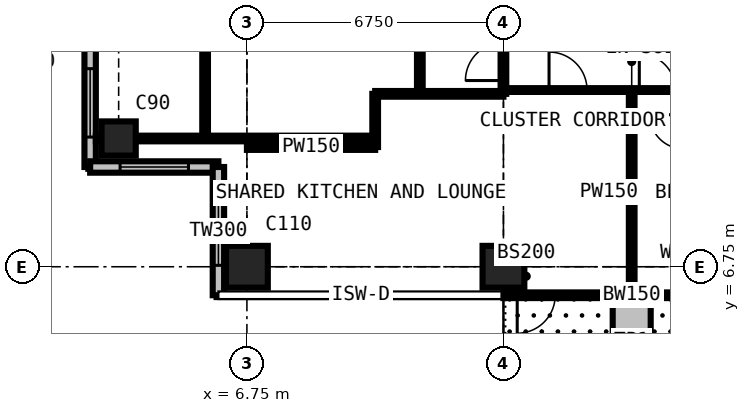
"""IFC4 building model, lengths in metres.
Left out: names, types, materials, properties, quantities, classifications, styles, units other than length and angle.
Written with IfcOpenShell. Run it as: python <this file> out.ifc"""

import sys

from ifc_helpers import new_model, si_unit, direction, frame, frame_2d, origin, origin_2d, place, context, subcontext, project, spatial, rectangle, extrude, element, fill, save


model = new_model("IFC4")
c1 = context("Model", 3, precision=1e-05, world=origin(), true_north=direction((0.0, 1.0)))
c2 = subcontext(c1, "Body", "Model", "MODEL_VIEW")
j1 = project(units=[si_unit("LENGTHUNIT", "METRE"), si_unit("PLANEANGLEUNIT", "RADIAN")], contexts=[c1])
p1 = place(None, origin())
s1 = spatial("IfcSite", under=j1, at=p1, CompositionType="ELEMENT")
p2 = place(p1, origin())
s2 = spatial("IfcBuilding", under=s1, at=p2, CompositionType="ELEMENT")
p3 = place(p2, frame((0.0, 0.0, 211.5)))
s3 = spatial("IfcBuildingStorey", under=s2, at=p3, CompositionType="ELEMENT", Elevation=211.5)
p4 = place(p3, frame((3.375, 10.125, 0.0), z_axis=(0.0, 0.0, 1.0), x_axis=(1.0, 0.0, 0.0)))
e1 = element("IfcColumn", 1, at=p4, inside=s3, PredefinedType="COLUMN", context=c2, shape_type="SweptSolid", body=[
    extrude(rectangle(XDim=0.9, YDim=0.9, at=origin_2d()), origin(), (0.0, 0.0, 1.0), 3.6),
])
for number, where, z_axis, x_axis in (
    (2, (6.75, 6.75, 0.0), (0.0, 0.0, 1.0), (1.0, 0.0, 0.0)),
    (3, (13.5, 6.75, 0.0), (0.0, 0.0, 1.0), (1.0, 0.0, 0.0)),
):
    element("IfcColumn", number, at=place(p3, frame(where, z_axis=z_axis, x_axis=x_axis)), inside=s3, PredefinedType="COLUMN", context=c2, shape_type="SweptSolid", body=[
        extrude(rectangle(XDim=1.1, YDim=1.1, at=origin_2d()), origin(), (0.0, 0.0, 1.0), 3.6),
    ])
p5 = place(p3, frame((2.625, 12.75, 0.0), z_axis=(0.0, 0.0, 1.0), x_axis=(0.0, -1.0, 0.0)))
e4 = element("IfcWall", 4, at=p5, inside=s3, PredefinedType="SOLIDWALL", context=c2, shape_type="SweptSolid", body=[
    extrude(rectangle(XDim=3.375, YDim=0.3, at=frame_2d((1.688, 0.0))), origin(), (0.0, 0.0, 1.0), 3.375),
])
p6 = place(p5, frame((0.788, 0.0, 0.6)))
e5 = element("IfcOpeningElement", 5, at=p6, cuts=e4, PredefinedType="OPENING", context=c2, shape_type="SweptSolid", body=[
    extrude(rectangle(XDim=1.8, YDim=2.1, at=frame_2d((0.9, 1.05))), frame((0.0, 0.16, 0.0), z_axis=(0.0, -1.0, 0.0), x_axis=(1.0, 0.0, 0.0)), (0.0, 0.0, 1.0), 0.32),
])
p7 = place(p3, frame((2.625, 9.375, 0.0), z_axis=(0.0, 0.0, 1.0), x_axis=(1.0, 0.0, 0.0)))
e6 = element("IfcWall", 6, at=p7, inside=s3, PredefinedType="SOLIDWALL", context=c2, shape_type="SweptSolid", body=[
    extrude(rectangle(XDim=3.375, YDim=0.3, at=frame_2d((1.688, 0.0))), origin(), (0.0, 0.0, 1.0), 3.375),
])
p8 = place(p7, frame((0.788, 0.0, 0.6)))
e7 = element("IfcOpeningElement", 7, at=p8, cuts=e6, PredefinedType="OPENING", context=c2, shape_type="SweptSolid", body=[
    extrude(rectangle(XDim=1.8, YDim=2.1, at=frame_2d((0.9, 1.05))), frame((0.0, 0.16, 0.0), z_axis=(0.0, -1.0, 0.0), x_axis=(1.0, 0.0, 0.0)), (0.0, 0.0, 1.0), 0.32),
])
p9 = place(p3, frame((6.0, 9.375, 0.0), z_axis=(0.0, 0.0, 1.0), x_axis=(0.0, -1.0, 0.0)))
e8 = element("IfcWall", 8, at=p9, inside=s3, PredefinedType="SOLIDWALL", context=c2, shape_type="SweptSolid", body=[
    extrude(rectangle(XDim=3.375, YDim=0.3, at=frame_2d((1.688, 0.0))), origin(), (0.0, 0.0, 1.0), 3.375),
])
p10 = place(p9, frame((0.788, 0.0, 0.6)))
e9 = element("IfcOpeningElement", 9, at=p10, cuts=e8, PredefinedType="OPENING", context=c2, shape_type="SweptSolid", body=[
    extrude(rectangle(XDim=1.8, YDim=2.1, at=frame_2d((0.9, 1.05))), frame((0.0, 0.16, 0.0), z_axis=(0.0, -1.0, 0.0), x_axis=(1.0, 0.0, 0.0)), (0.0, 0.0, 1.0), 0.32),
])
p11 = place(p3, frame((20.25, 6.0, 0.0), z_axis=(0.0, 0.0, 1.0), x_axis=(-1.0, 0.0, 0.0)))
e10 = element("IfcWall", 10, at=p11, inside=s3, PredefinedType="SOLIDWALL", context=c2, shape_type="SweptSolid", body=[
    extrude(rectangle(XDim=6.75, YDim=0.15, at=frame_2d((3.375, 0.0))), origin(), (0.0, 0.0, 1.0), 3.375),
])
p12 = place(p11, frame((0.363, 0.0, 0.0)))
e11 = element("IfcOpeningElement", 11, at=p12, cuts=e10, PredefinedType="OPENING", context=c2, shape_type="SweptSolid", body=[
    extrude(rectangle(XDim=1.0, YDim=2.2, at=frame_2d((0.5, 1.1))), frame((0.0, 0.085, 0.0), z_axis=(0.0, -1.0, 0.0), x_axis=(1.0, 0.0, 0.0)), (0.0, 0.0, 1.0), 0.17),
])
p13 = place(p11, frame((1.725, 0.0, 0.9)))
e12 = element("IfcOpeningElement", 12, at=p13, cuts=e10, PredefinedType="OPENING", context=c2, shape_type="SweptSolid", body=[
    extrude(rectangle(XDim=1.2, YDim=1.8, at=frame_2d((0.6, 0.9))), frame((0.0, 0.085, 0.0), z_axis=(0.0, -1.0, 0.0), x_axis=(1.0, 0.0, 0.0)), (0.0, 0.0, 1.0), 0.17),
])
p14 = place(p11, frame((5.387, 0.0, 0.0)))
e13 = element("IfcOpeningElement", 13, at=p14, cuts=e10, PredefinedType="OPENING", context=c2, shape_type="SweptSolid", body=[
    extrude(rectangle(XDim=1.0, YDim=2.2, at=frame_2d((0.5, 1.1))), frame((0.0, 0.085, 0.0), z_axis=(0.0, -1.0, 0.0), x_axis=(1.0, 0.0, 0.0)), (0.0, 0.0, 1.0), 0.17),
])
p15 = place(p11, frame((3.825, 0.0, 0.9)))
e14 = element("IfcOpeningElement", 14, at=p15, cuts=e10, PredefinedType="OPENING", context=c2, shape_type="SweptSolid", body=[
    extrude(rectangle(XDim=1.2, YDim=1.8, at=frame_2d((0.6, 0.9))), frame((0.0, 0.085, 0.0), z_axis=(0.0, -1.0, 0.0), x_axis=(1.0, 0.0, 0.0)), (0.0, 0.0, 1.0), 0.17),
])
p16 = place(p3, frame((16.875, 5.9, 0.0), z_axis=(0.0, 0.0, 1.0), x_axis=(0.0, -1.0, 0.0)))
e15 = element("IfcWall", 15, at=p16, inside=s3, PredefinedType="USERDEFINED", context=c2, shape_type="SweptSolid", body=[
    extrude(rectangle(XDim=2.2, YDim=1.0, at=frame_2d((1.1, 0.0))), origin(), (0.0, 0.0, 1.0), 0.9),
])
p17 = place(p3, frame((2.775, 10.125, 0.0), z_axis=(0.0, 0.0, 1.0), x_axis=(1.0, 0.0, 0.0)))
e16 = element("IfcWall", 16, at=p17, inside=s3, PredefinedType="PARTITIONING", context=c2, shape_type="SweptSolid", body=[
    extrude(rectangle(XDim=7.35, YDim=0.15, at=frame_2d((3.675, 0.0))), origin(), (0.0, 0.0, 1.0), 2.877),
])
p18 = place(p3, frame((5.65, 10.125, 0.0), z_axis=(0.0, 0.0, 1.0), x_axis=(0.0, 1.0, 0.0)))
e17 = element("IfcWall", 17, at=p18, inside=s3, PredefinedType="PARTITIONING", context=c2, shape_type="SweptSolid", body=[
    extrude(rectangle(XDim=10.762, YDim=0.15, at=frame_2d((5.381, 0.0))), origin(), (0.0, 0.0, 1.0), 3.375),
])
p19 = place(p18, frame((4.9, 0.0, 0.0)))
e18 = element("IfcOpeningElement", 18, at=p19, cuts=e17, PredefinedType="OPENING", context=c2, shape_type="SweptSolid", body=[
    extrude(rectangle(XDim=0.95, YDim=2.2, at=frame_2d((0.475, 1.1))), frame((0.0, 0.085, 0.0), z_axis=(0.0, -1.0, 0.0), x_axis=(1.0, 0.0, 0.0)), (0.0, 0.0, 1.0), 0.17),
])
p20 = place(p3, frame((6.75, 9.9, 0.0), z_axis=(0.0, 0.0, 1.0), x_axis=(1.0, 0.0, 0.0)))
e19 = element("IfcWall", 19, at=p20, inside=s3, PredefinedType="PARTITIONING", context=c2, shape_type="SweptSolid", body=[
    extrude(rectangle(XDim=3.375, YDim=0.15, at=frame_2d((1.688, 0.0))), origin(), (0.0, 0.0, 1.0), 3.375),
])
p21 = place(p3, frame((10.125, 9.9, 0.0), z_axis=(0.0, 0.0, 1.0), x_axis=(0.0, 1.0, 0.0)))
e20 = element("IfcWall", 20, at=p21, inside=s3, PredefinedType="PARTITIONING", context=c2, shape_type="SweptSolid", body=[
    extrude(rectangle(XDim=1.4, YDim=0.15, at=frame_2d((0.7, 0.0))), origin(), (0.0, 0.0, 1.0), 3.375),
])
p22 = place(p3, frame((10.125, 11.3, 0.0), z_axis=(0.0, 0.0, 1.0), x_axis=(1.0, 0.0, 0.0)))
e21 = element("IfcWall", 21, at=p22, inside=s3, PredefinedType="PARTITIONING", context=c2, shape_type="SweptSolid", body=[
    extrude(rectangle(XDim=3.375, YDim=0.15, at=frame_2d((1.688, 0.0))), origin(), (0.0, 0.0, 1.0), 3.375),
])
p23 = place(p3, frame((11.3, 11.3, 0.0), z_axis=(0.0, 0.0, 1.0), x_axis=(0.0, 1.0, 0.0)))
e22 = element("IfcWall", 22, at=p23, inside=s3, PredefinedType="PARTITIONING", context=c2, shape_type="SweptSolid", body=[
    extrude(rectangle(XDim=19.3, YDim=0.15, at=frame_2d((9.65, 0.0))), origin(), (0.0, 0.0, 1.0), 3.375),
])
p24 = place(p23, frame((18.1, 0.0, 0.0)))
e23 = element("IfcOpeningElement", 23, at=p24, cuts=e22, PredefinedType="OPENING", context=c2, shape_type="SweptSolid", body=[
    extrude(rectangle(XDim=1.0, YDim=2.2, at=frame_2d((0.5, 1.1))), frame((0.0, 0.085, 0.0), z_axis=(0.0, -1.0, 0.0), x_axis=(1.0, 0.0, 0.0)), (0.0, 0.0, 1.0), 0.17),
])
p25 = place(p23, frame((10.137, 0.0, 0.0)))
e24 = element("IfcOpeningElement", 24, at=p25, cuts=e22, PredefinedType="OPENING", context=c2, shape_type="SweptSolid", body=[
    extrude(rectangle(XDim=1.0, YDim=2.2, at=frame_2d((0.5, 1.1))), frame((0.0, 0.085, 0.0), z_axis=(0.0, -1.0, 0.0), x_axis=(1.0, 0.0, 0.0)), (0.0, 0.0, 1.0), 0.17),
])
p26 = place(p3, frame((13.5, 11.3, 0.0), z_axis=(0.0, 0.0, 1.0), x_axis=(0.0, 1.0, 0.0)))
e25 = element("IfcWall", 25, at=p26, inside=s3, PredefinedType="PARTITIONING", context=c2, shape_type="SweptSolid", body=[
    extrude(rectangle(XDim=1.6, YDim=0.15, at=frame_2d((0.8, 0.0))), origin(), (0.0, 0.0, 1.0), 2.877),
])
p27 = place(p26, frame((0.35, 0.0, 0.0)))
e26 = element("IfcOpeningElement", 26, at=p27, cuts=e25, PredefinedType="OPENING", context=c2, shape_type="SweptSolid", body=[
    extrude(rectangle(XDim=1.0, YDim=2.2, at=frame_2d((0.5, 1.1))), frame((0.0, 0.085, 0.0), z_axis=(0.0, -1.0, 0.0), x_axis=(1.0, 0.0, 0.0)), (0.0, 0.0, 1.0), 0.17),
])
p28 = place(p3, frame((13.5, 11.4, 0.0), z_axis=(0.0, 0.0, 1.0), x_axis=(1.0, 0.0, 0.0)))
e27 = element("IfcWall", 27, at=p28, inside=s3, PredefinedType="PARTITIONING", context=c2, shape_type="SweptSolid", body=[
    extrude(rectangle(XDim=10.125, YDim=0.1, at=frame_2d((5.062, 0.0))), origin(), (0.0, 0.0, 1.0), 3.375),
])
p29 = place(p28, frame((1.2, 0.0, 0.0)))
e28 = element("IfcOpeningElement", 28, at=p29, cuts=e27, PredefinedType="OPENING", context=c2, shape_type="SweptSolid", body=[
    extrude(rectangle(XDim=1.0, YDim=2.2, at=frame_2d((0.5, 1.1))), frame((0.0, 0.06, 0.0), z_axis=(0.0, -1.0, 0.0), x_axis=(1.0, 0.0, 0.0)), (0.0, 0.0, 1.0), 0.12),
])
p30 = place(p28, frame((3.575, 0.0, 0.0)))
e29 = element("IfcOpeningElement", 29, at=p30, cuts=e27, PredefinedType="OPENING", context=c2, shape_type="SweptSolid", body=[
    extrude(rectangle(XDim=0.95, YDim=2.2, at=frame_2d((0.475, 1.1))), frame((0.0, 0.06, 0.0), z_axis=(0.0, -1.0, 0.0), x_axis=(1.0, 0.0, 0.0)), (0.0, 0.0, 1.0), 0.12),
])
p31 = place(p28, frame((6.95, 0.0, 0.0)))
e30 = element("IfcOpeningElement", 30, at=p31, cuts=e27, PredefinedType="OPENING", context=c2, shape_type="SweptSolid", body=[
    extrude(rectangle(XDim=0.95, YDim=2.2, at=frame_2d((0.475, 1.1))), frame((0.0, 0.06, 0.0), z_axis=(0.0, -1.0, 0.0), x_axis=(1.0, 0.0, 0.0)), (0.0, 0.0, 1.0), 0.12),
])
p32 = place(p3, frame((16.875, 6.016, 0.0), z_axis=(0.0, 0.0, 1.0), x_axis=(0.0, 1.0, 0.0)))
e31 = element("IfcWall", 31, at=p32, inside=s3, PredefinedType="PARTITIONING", context=c2, shape_type="SweptSolid", body=[
    extrude(rectangle(XDim=5.384, YDim=0.15, at=frame_2d((2.692, 0.0))), origin(), (0.0, 0.0, 1.0), 3.375),
])
p33 = place(p6, origin())
e32 = element("IfcWindow", 32, at=p33, inside=s3, PartitioningType="SINGLE_PANEL", PredefinedType="WINDOW", context=c2, shape_type="SweptSolid", body=[
    extrude(rectangle(XDim=1.8, YDim=2.1, at=frame_2d((0.9, 1.05))), frame((0.0, 0.03, 0.0), z_axis=(0.0, -1.0, 0.0), x_axis=(1.0, 0.0, 0.0)), (0.0, 0.0, 1.0), 0.06),
])
fill(e5, e32)
p34 = place(p8, origin())
e33 = element("IfcWindow", 33, at=p34, inside=s3, PartitioningType="SINGLE_PANEL", PredefinedType="WINDOW", context=c2, shape_type="SweptSolid", body=[
    extrude(rectangle(XDim=1.8, YDim=2.1, at=frame_2d((0.9, 1.05))), frame((0.0, 0.03, 0.0), z_axis=(0.0, -1.0, 0.0), x_axis=(1.0, 0.0, 0.0)), (0.0, 0.0, 1.0), 0.06),
])
fill(e7, e33)
p35 = place(p10, origin())
e34 = element("IfcWindow", 34, at=p35, inside=s3, PartitioningType="SINGLE_PANEL", PredefinedType="WINDOW", context=c2, shape_type="SweptSolid", body=[
    extrude(rectangle(XDim=1.8, YDim=2.1, at=frame_2d((0.9, 1.05))), frame((0.0, 0.03, 0.0), z_axis=(0.0, -1.0, 0.0), x_axis=(1.0, 0.0, 0.0)), (0.0, 0.0, 1.0), 0.06),
])
fill(e9, e34)
p36 = place(p13, origin())
e35 = element("IfcWindow", 35, at=p36, inside=s3, PartitioningType="SINGLE_PANEL", PredefinedType="WINDOW", context=c2, shape_type="SweptSolid", body=[
    extrude(rectangle(XDim=1.2, YDim=1.8, at=frame_2d((0.6, 0.9))), frame((0.0, 0.03, 0.0), z_axis=(0.0, -1.0, 0.0), x_axis=(1.0, 0.0, 0.0)), (0.0, 0.0, 1.0), 0.06),
])
fill(e12, e35)
p37 = place(p14, origin())
e36 = element("IfcDoor", 36, at=p37, inside=s3, OperationType="SINGLE_SWING_RIGHT", PredefinedType="DOOR", context=c2, shape_type="SweptSolid", body=[
    extrude(rectangle(XDim=1.0, YDim=2.2, at=frame_2d((0.5, 1.1))), frame((0.0, 0.025, 0.0), z_axis=(0.0, -1.0, 0.0), x_axis=(1.0, 0.0, 0.0)), (0.0, 0.0, 1.0), 0.05),
])
fill(e13, e36)
p38 = place(p15, origin())
e37 = element("IfcWindow", 37, at=p38, inside=s3, PartitioningType="SINGLE_PANEL", PredefinedType="WINDOW", context=c2, shape_type="SweptSolid", body=[
    extrude(rectangle(XDim=1.2, YDim=1.8, at=frame_2d((0.6, 0.9))), frame((0.0, 0.03, 0.0), z_axis=(0.0, -1.0, 0.0), x_axis=(1.0, 0.0, 0.0)), (0.0, 0.0, 1.0), 0.06),
])
fill(e14, e37)
p39 = place(p29, origin())
e38 = element("IfcDoor", 38, at=p39, inside=s3, OperationType="SINGLE_SWING_LEFT", PredefinedType="DOOR", context=c2, shape_type="SweptSolid", body=[
    extrude(rectangle(XDim=1.0, YDim=2.2, at=frame_2d((0.5, 1.1))), frame((0.0, 0.025, 0.0), z_axis=(0.0, -1.0, 0.0), x_axis=(1.0, 0.0, 0.0)), (0.0, 0.0, 1.0), 0.05),
])
fill(e28, e38)
p40 = place(p30, origin())
e39 = element("IfcDoor", 39, at=p40, inside=s3, OperationType="SINGLE_SWING_LEFT", PredefinedType="DOOR", context=c2, shape_type="SweptSolid", body=[
    extrude(rectangle(XDim=0.95, YDim=2.2, at=frame_2d((0.475, 1.1))), frame((0.0, 0.025, 0.0), z_axis=(0.0, -1.0, 0.0), x_axis=(1.0, 0.0, 0.0)), (0.0, 0.0, 1.0), 0.05),
])
fill(e29, e39)
p41 = place(p27, origin())
e40 = element("IfcDoor", 40, at=p41, inside=s3, OperationType="SINGLE_SWING_LEFT", PredefinedType="DOOR", context=c2, shape_type="SweptSolid", body=[
    extrude(rectangle(XDim=1.0, YDim=2.2, at=frame_2d((0.5, 1.1))), frame((0.0, 0.025, 0.0), z_axis=(0.0, -1.0, 0.0), x_axis=(1.0, 0.0, 0.0)), (0.0, 0.0, 1.0), 0.05),
])
fill(e26, e40)
save(model, sys.argv[1])
